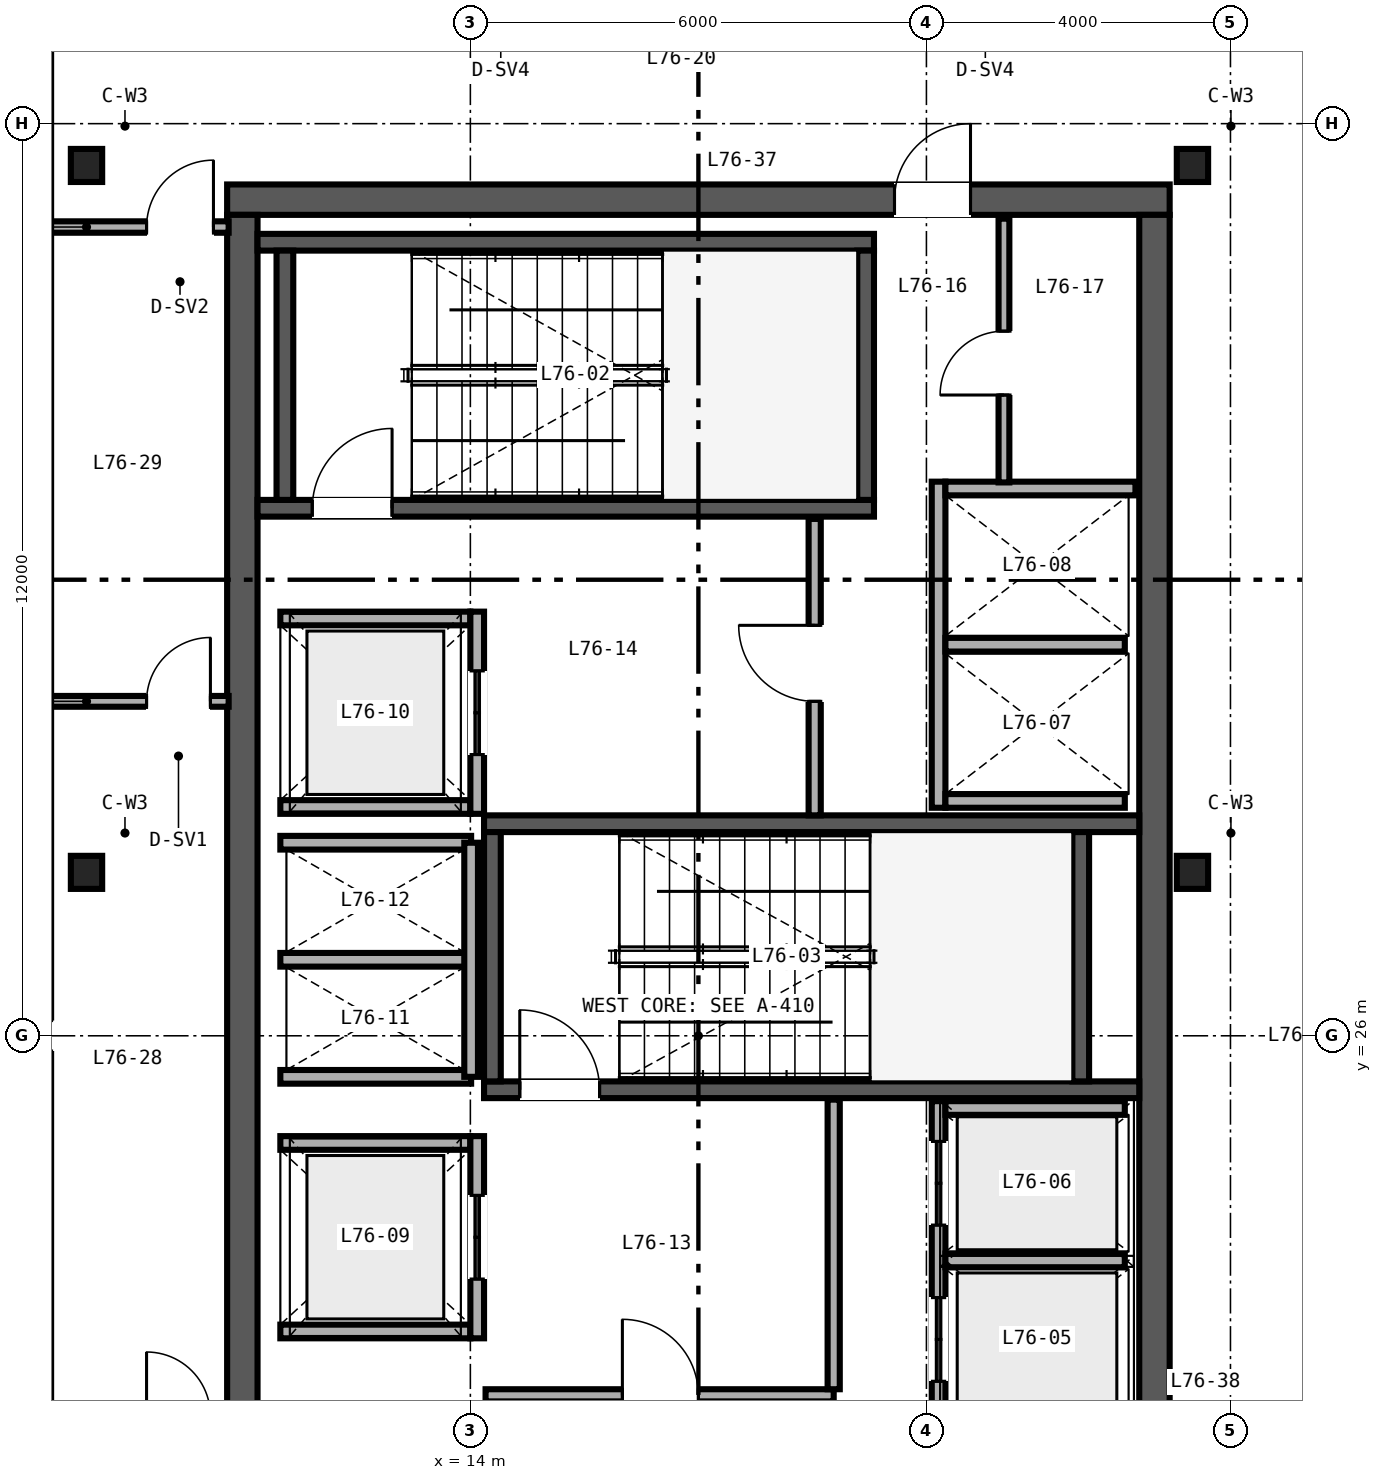
"""IFC4 building model, lengths in metres.
Left out: names, types, materials, properties, quantities, classifications, styles, units other than length and angle.
Written with IfcOpenShell. Run it as: python <this file> out.ifc"""

import sys

from ifc_helpers import new_model, si_unit, direction, frame, frame_2d, origin, origin_2d, place, context, subcontext, project, spatial, rectangle, i_section, extrude, source, transform, mapped, element, fill, save


model = new_model("IFC4")
c1 = context("Model", 3, precision=1e-05, world=origin(), true_north=direction((0.0, 1.0)))
c2 = subcontext(c1, "Body", "Model", "MODEL_VIEW")
j1 = project(units=[si_unit("LENGTHUNIT", "METRE"), si_unit("PLANEANGLEUNIT", "RADIAN")], contexts=[c1])
p1 = place(None, origin())
s1 = spatial("IfcSite", under=j1, at=p1, CompositionType="ELEMENT")
p2 = place(p1, origin())
s2 = spatial("IfcBuilding", under=s1, at=p2, CompositionType="ELEMENT")
p3 = place(p2, frame((0.0, 0.0, 297.6)))
s3 = spatial("IfcBuildingStorey", under=s2, at=p3, CompositionType="ELEMENT", Elevation=297.6)
p4 = place(p3, frame((10.8, 37.0, 0.0), z_axis=(0.0, 0.0, 1.0), x_axis=(1.0, 0.0, 0.0)))
e1 = element("IfcWall", 1, at=p4, inside=s3, PredefinedType="SHEAR", context=c2, shape_type="SweptSolid", body=[
    extrude(rectangle(XDim=12.4, YDim=0.4, at=frame_2d((6.2, 0.0))), origin(), (0.0, 0.0, 1.0), 3.32),
])
p5 = place(p4, frame((8.78, 0.0, 0.0)))
e2 = element("IfcOpeningElement", 2, at=p5, cuts=e1, PredefinedType="OPENING", context=c2, shape_type="SweptSolid", body=[
    extrude(rectangle(XDim=1.0, YDim=2.15, at=frame_2d((0.5, 1.075))), frame((0.0, 0.21, 0.0), z_axis=(0.0, -1.0, 0.0), x_axis=(1.0, 0.0, 0.0)), (0.0, 0.0, 1.0), 0.42),
])
for number, where, z_axis, x_axis in (
    (3, (11.0, 15.2, 0.0), (0.0, 0.0, 1.0), (0.0, 1.0, 0.0)),
    (4, (23.0, 15.2, 0.0), (0.0, 0.0, 1.0), (0.0, 1.0, 0.0)),
):
    element("IfcWall", number, at=place(p3, frame(where, z_axis=z_axis, x_axis=x_axis)), inside=s3, PredefinedType="SHEAR", context=c2, shape_type="SweptSolid", body=[
        extrude(rectangle(XDim=21.6, YDim=0.4, at=frame_2d((10.8, 0.0))), origin(), (0.0, 0.0, 1.0), 3.32),
    ])
p6 = place(p3, frame((11.2, 32.94, 0.0), z_axis=(0.0, 0.0, 1.0), x_axis=(1.0, 0.0, 0.0)))
e5 = element("IfcWall", 5, at=p6, inside=s3, PredefinedType="SHEAR", context=c2, shape_type="SweptSolid", body=[
    extrude(rectangle(XDim=8.11, YDim=0.22, at=frame_2d((4.055, 0.0))), origin(), (0.0, 0.0, 1.0), 3.4),
])
p7 = place(p6, frame((0.72, 0.0, 0.0)))
e6 = element("IfcOpeningElement", 6, at=p7, cuts=e5, PredefinedType="OPENING", context=c2, shape_type="SweptSolid", body=[
    extrude(rectangle(XDim=1.05, YDim=2.15, at=frame_2d((0.525, 1.075))), frame((0.0, 0.12, 0.0), z_axis=(0.0, -1.0, 0.0), x_axis=(1.0, 0.0, 0.0)), (0.0, 0.0, 1.0), 0.24),
])
p8 = place(p3, frame((11.2, 36.44, 0.0), z_axis=(0.0, 0.0, 1.0), x_axis=(1.0, 0.0, 0.0)))
e7 = element("IfcWall", 7, at=p8, inside=s3, PredefinedType="SHEAR", context=c2, shape_type="SweptSolid", body=[
    extrude(rectangle(XDim=8.11, YDim=0.22, at=frame_2d((4.055, 0.0))), origin(), (0.0, 0.0, 1.0), 3.4),
])
for number, where, z_axis, x_axis in (
    (8, (11.56, 33.05, 0.0), (0.0, 0.0, 1.0), (0.0, 1.0, 0.0)),
    (9, (19.2, 33.05, 0.0), (0.0, 0.0, 1.0), (0.0, 1.0, 0.0)),
):
    element("IfcWall", number, at=place(p3, frame(where, z_axis=z_axis, x_axis=x_axis)), inside=s3, PredefinedType="SHEAR", context=c2, shape_type="SweptSolid", body=[
        extrude(rectangle(XDim=3.28, YDim=0.22, at=frame_2d((1.64, 0.0))), origin(), (0.0, 0.0, 1.0), 3.4),
    ])
p9 = place(p3, frame((14.18, 25.29, 0.0), z_axis=(0.0, 0.0, 1.0), x_axis=(1.0, 0.0, 0.0)))
e10 = element("IfcWall", 10, at=p9, inside=s3, PredefinedType="SHEAR", context=c2, shape_type="SweptSolid", body=[
    extrude(rectangle(XDim=8.62, YDim=0.22, at=frame_2d((4.31, 0.0))), origin(), (0.0, 0.0, 1.0), 3.4),
])
p10 = place(p9, frame((0.47, 0.0, 0.0)))
e11 = element("IfcOpeningElement", 11, at=p10, cuts=e10, PredefinedType="OPENING", context=c2, shape_type="SweptSolid", body=[
    extrude(rectangle(XDim=1.05, YDim=2.15, at=frame_2d((0.525, 1.075))), frame((0.0, 0.12, 0.0), z_axis=(0.0, -1.0, 0.0), x_axis=(1.0, 0.0, 0.0)), (0.0, 0.0, 1.0), 0.24),
])
p11 = place(p3, frame((14.18, 28.79, 0.0), z_axis=(0.0, 0.0, 1.0), x_axis=(1.0, 0.0, 0.0)))
e12 = element("IfcWall", 12, at=p11, inside=s3, PredefinedType="SHEAR", context=c2, shape_type="SweptSolid", body=[
    extrude(rectangle(XDim=8.62, YDim=0.22, at=frame_2d((4.31, 0.0))), origin(), (0.0, 0.0, 1.0), 3.4),
])
for number, where, z_axis, x_axis in (
    (13, (14.29, 25.4, 0.0), (0.0, 0.0, 1.0), (0.0, 1.0, 0.0)),
    (14, (22.03, 25.4, 0.0), (0.0, 0.0, 1.0), (0.0, 1.0, 0.0)),
):
    element("IfcWall", number, at=place(p3, frame(where, z_axis=z_axis, x_axis=x_axis)), inside=s3, PredefinedType="SHEAR", context=c2, shape_type="SweptSolid", body=[
        extrude(rectangle(XDim=3.28, YDim=0.22, at=frame_2d((1.64, 0.0))), origin(), (0.0, 0.0, 1.0), 3.4),
    ])
m1 = source(origin(), c2, "Body", "SweptSolid", [
    extrude(i_section(OverallWidth=0.412, OverallDepth=0.435, WebThickness=0.036, FlangeThickness=0.057, FilletRadius=0.025, at=origin_2d()), origin(), (0.0, 0.0, 1.0), 3.32),
])
for number, where, z_axis, x_axis in (
    (15, (8.95, 28.15, 0.0), (0.0, 0.0, 1.0), (1.0, 0.0, 0.0)),
    (16, (23.5, 28.15, 0.0), (0.0, 0.0, 1.0), (1.0, 0.0, 0.0)),
    (17, (8.95, 37.45, 0.0), (0.0, 0.0, 1.0), (1.0, 0.0, 0.0)),
    (18, (23.5, 37.45, 0.0), (0.0, 0.0, 1.0), (1.0, 0.0, 0.0)),
):
    element("IfcColumn", number, at=place(p3, frame(where, z_axis=z_axis, x_axis=x_axis)), inside=s3, PredefinedType="COLUMN", context=c2, shape_type="MappedRepresentation", body=[
        mapped(m1, transform((0.0, 0.0, 0.0), scale=1.0)),
    ])
p12 = place(p3, frame((20.16, 18.82, 0.0), z_axis=(0.0, 0.0, 1.0), x_axis=(0.0, 1.0, 0.0)))
e19 = element("IfcWall", 19, at=p12, inside=s3, PredefinedType="SOLIDWALL", context=c2, shape_type="SweptSolid", body=[
    extrude(rectangle(XDim=6.32, YDim=0.18, at=frame_2d((3.16, 0.0))), origin(), (0.0, 0.0, 1.0), 2.42),
])
p13 = place(p12, frame((0.555, 0.0, 0.0)))
e20 = element("IfcOpeningElement", 20, at=p13, cuts=e19, PredefinedType="OPENING", context=c2, shape_type="SweptSolid", body=[
    extrude(rectangle(XDim=1.1, YDim=2.2, at=frame_2d((0.55, 1.1))), frame((0.0, 0.1, 0.0), z_axis=(0.0, -1.0, 0.0), x_axis=(1.0, 0.0, 0.0)), (0.0, 0.0, 1.0), 0.2),
])
p14 = place(p12, frame((2.635, 0.0, 0.0)))
e21 = element("IfcOpeningElement", 21, at=p14, cuts=e19, PredefinedType="OPENING", context=c2, shape_type="SweptSolid", body=[
    extrude(rectangle(XDim=1.1, YDim=2.2, at=frame_2d((0.55, 1.1))), frame((0.0, 0.1, 0.0), z_axis=(0.0, -1.0, 0.0), x_axis=(1.0, 0.0, 0.0)), (0.0, 0.0, 1.0), 0.2),
])
p15 = place(p12, frame((4.69, 0.0, 0.0)))
e22 = element("IfcOpeningElement", 22, at=p15, cuts=e19, PredefinedType="OPENING", context=c2, shape_type="SweptSolid", body=[
    extrude(rectangle(XDim=1.1, YDim=2.2, at=frame_2d((0.55, 1.1))), frame((0.0, 0.1, 0.0), z_axis=(0.0, -1.0, 0.0), x_axis=(1.0, 0.0, 0.0)), (0.0, 0.0, 1.0), 0.2),
])
for number, where, z_axis, x_axis in (
    (23, (20.25, 25.05, 0.0), (0.0, 0.0, 1.0), (1.0, 0.0, 0.0)),
    (24, (20.25, 23.045, 0.0), (0.0, 0.0, 1.0), (1.0, 0.0, 0.0)),
):
    element("IfcWall", number, at=place(p3, frame(where, z_axis=z_axis, x_axis=x_axis)), inside=s3, PredefinedType="SOLIDWALL", context=c2, shape_type="SweptSolid", body=[
        extrude(rectangle(XDim=2.36, YDim=0.18, at=frame_2d((1.18, 0.0))), origin(), (0.0, 0.0, 1.0), 3.32),
    ])
p16 = place(p3, frame((20.16, 29.0, 0.0), z_axis=(0.0, 0.0, 1.0), x_axis=(0.0, 1.0, 0.0)))
e25 = element("IfcWall", 25, at=p16, inside=s3, PredefinedType="SOLIDWALL", context=c2, shape_type="SweptSolid", body=[
    extrude(rectangle(XDim=4.29, YDim=0.18, at=frame_2d((2.145, 0.0))), origin(), (0.0, 0.0, 1.0), 3.32),
])
p17 = place(p3, frame((20.25, 29.09, 0.0), z_axis=(0.0, 0.0, 1.0), x_axis=(1.0, 0.0, 0.0)))
e26 = element("IfcWall", 26, at=p17, inside=s3, PredefinedType="SOLIDWALL", context=c2, shape_type="SweptSolid", body=[
    extrude(rectangle(XDim=2.36, YDim=0.18, at=frame_2d((1.18, 0.0))), origin(), (0.0, 0.0, 1.0), 3.32),
])
p18 = place(p3, frame((20.25, 33.2, 0.0), z_axis=(0.0, 0.0, 1.0), x_axis=(1.0, 0.0, 0.0)))
e27 = element("IfcWall", 27, at=p18, inside=s3, PredefinedType="SOLIDWALL", context=c2, shape_type="SweptSolid", body=[
    extrude(rectangle(XDim=2.5, YDim=0.18, at=frame_2d((1.25, 0.0))), origin(), (0.0, 0.0, 1.0), 3.32),
])
p19 = place(p3, frame((20.25, 31.145, 0.0), z_axis=(0.0, 0.0, 1.0), x_axis=(1.0, 0.0, 0.0)))
e28 = element("IfcWall", 28, at=p19, inside=s3, PredefinedType="SOLIDWALL", context=c2, shape_type="SweptSolid", body=[
    extrude(rectangle(XDim=2.36, YDim=0.18, at=frame_2d((1.18, 0.0))), origin(), (0.0, 0.0, 1.0), 3.32),
])
for number, where, z_axis, x_axis in (
    (29, (11.5, 22.11, 0.0), (0.0, 0.0, 1.0), (1.0, 0.0, 0.0)),
    (30, (11.5, 24.59, 0.0), (0.0, 0.0, 1.0), (1.0, 0.0, 0.0)),
):
    element("IfcWall", number, at=place(p3, frame(where, z_axis=z_axis, x_axis=x_axis)), inside=s3, PredefinedType="SOLIDWALL", context=c2, shape_type="SweptSolid", body=[
        extrude(rectangle(XDim=2.5, YDim=0.18, at=frame_2d((1.25, 0.0))), origin(), (0.0, 0.0, 1.0), 3.32),
    ])
p20 = place(p3, frame((14.09, 22.02, 0.0), z_axis=(0.0, 0.0, 1.0), x_axis=(0.0, 1.0, 0.0)))
e31 = element("IfcWall", 31, at=p20, inside=s3, PredefinedType="SOLIDWALL", context=c2, shape_type="SweptSolid", body=[
    extrude(rectangle(XDim=2.66, YDim=0.18, at=frame_2d((1.33, 0.0))), origin(), (0.0, 0.0, 1.0), 3.32),
])
p21 = place(p20, frame((0.78, 0.0, 0.0)))
e32 = element("IfcOpeningElement", 32, at=p21, cuts=e31, PredefinedType="OPENING", context=c2, shape_type="SweptSolid", body=[
    extrude(rectangle(XDim=1.1, YDim=2.2, at=frame_2d((0.55, 1.1))), frame((0.0, 0.1, 0.0), z_axis=(0.0, -1.0, 0.0), x_axis=(1.0, 0.0, 0.0)), (0.0, 0.0, 1.0), 0.2),
])
for number, where, z_axis, x_axis in (
    (33, (11.5, 29.01, 0.0), (0.0, 0.0, 1.0), (1.0, 0.0, 0.0)),
    (34, (11.5, 31.49, 0.0), (0.0, 0.0, 1.0), (1.0, 0.0, 0.0)),
):
    element("IfcWall", number, at=place(p3, frame(where, z_axis=z_axis, x_axis=x_axis)), inside=s3, PredefinedType="SOLIDWALL", context=c2, shape_type="SweptSolid", body=[
        extrude(rectangle(XDim=2.5, YDim=0.18, at=frame_2d((1.25, 0.0))), origin(), (0.0, 0.0, 1.0), 3.32),
    ])
p22 = place(p3, frame((14.09, 28.92, 0.0), z_axis=(0.0, 0.0, 1.0), x_axis=(0.0, 1.0, 0.0)))
e35 = element("IfcWall", 35, at=p22, inside=s3, PredefinedType="SOLIDWALL", context=c2, shape_type="SweptSolid", body=[
    extrude(rectangle(XDim=2.66, YDim=0.18, at=frame_2d((1.33, 0.0))), origin(), (0.0, 0.0, 1.0), 3.32),
])
p23 = place(p22, frame((0.78, 0.0, 0.0)))
e36 = element("IfcOpeningElement", 36, at=p23, cuts=e35, PredefinedType="OPENING", context=c2, shape_type="SweptSolid", body=[
    extrude(rectangle(XDim=1.1, YDim=2.2, at=frame_2d((0.55, 1.1))), frame((0.0, 0.1, 0.0), z_axis=(0.0, -1.0, 0.0), x_axis=(1.0, 0.0, 0.0)), (0.0, 0.0, 1.0), 0.2),
])
for number, where, z_axis, x_axis in (
    (37, (11.5, 25.46, 0.0), (0.0, 0.0, 1.0), (1.0, 0.0, 0.0)),
    (38, (11.5, 27.0, 0.0), (0.0, 0.0, 1.0), (1.0, 0.0, 0.0)),
    (39, (11.5, 28.54, 0.0), (0.0, 0.0, 1.0), (1.0, 0.0, 0.0)),
):
    element("IfcWall", number, at=place(p3, frame(where, z_axis=z_axis, x_axis=x_axis)), inside=s3, PredefinedType="SOLIDWALL", context=c2, shape_type="SweptSolid", body=[
        extrude(rectangle(XDim=2.51, YDim=0.18, at=frame_2d((1.255, 0.0))), origin(), (0.0, 0.0, 1.0), 3.32),
    ])
p24 = place(p3, frame((14.01, 25.46, 0.0), z_axis=(0.0, 0.0, 1.0), x_axis=(0.0, 1.0, 0.0)))
e40 = element("IfcWall", 40, at=p24, inside=s3, PredefinedType="SOLIDWALL", context=c2, shape_type="SweptSolid", body=[
    extrude(rectangle(XDim=3.08, YDim=0.18, at=frame_2d((1.54, 0.0))), origin(), (0.0, 0.0, 1.0), 3.32),
])
p25 = place(p3, frame((14.2, 21.27, 0.0), z_axis=(0.0, 0.0, 1.0), x_axis=(1.0, 0.0, 0.0)))
e41 = element("IfcWall", 41, at=p25, inside=s3, PredefinedType="PARTITIONING", context=c2, shape_type="SweptSolid", body=[
    extrude(rectangle(XDim=4.58, YDim=0.16, at=frame_2d((2.29, 0.0))), origin(), (0.0, 0.0, 1.0), 3.32),
])
p26 = place(p25, frame((1.8, 0.0, 0.0)))
e42 = element("IfcOpeningElement", 42, at=p26, cuts=e41, PredefinedType="OPENING", context=c2, shape_type="SweptSolid", body=[
    extrude(rectangle(XDim=1.0, YDim=2.15, at=frame_2d((0.5, 1.075))), frame((0.0, 0.09, 0.0), z_axis=(0.0, -1.0, 0.0), x_axis=(1.0, 0.0, 0.0)), (0.0, 0.0, 1.0), 0.18),
])
p27 = place(p3, frame((18.78, 21.35, 0.0), z_axis=(0.0, 0.0, 1.0), x_axis=(0.0, 1.0, 0.0)))
e43 = element("IfcWall", 43, at=p27, inside=s3, PredefinedType="PARTITIONING", context=c2, shape_type="SweptSolid", body=[
    extrude(rectangle(XDim=3.81, YDim=0.16, at=frame_2d((1.905, 0.0))), origin(), (0.0, 0.0, 1.0), 3.32),
])
p28 = place(p3, frame((18.53, 28.9, 0.0), z_axis=(0.0, 0.0, 1.0), x_axis=(0.0, 1.0, 0.0)))
e44 = element("IfcWall", 44, at=p28, inside=s3, PredefinedType="PARTITIONING", context=c2, shape_type="SweptSolid", body=[
    extrude(rectangle(XDim=3.9, YDim=0.16, at=frame_2d((1.95, 0.0))), origin(), (0.0, 0.0, 1.0), 3.32),
])
p29 = place(p28, frame((1.5, 0.0, 0.0)))
e45 = element("IfcOpeningElement", 45, at=p29, cuts=e44, PredefinedType="OPENING", context=c2, shape_type="SweptSolid", body=[
    extrude(rectangle(XDim=1.0, YDim=2.15, at=frame_2d((0.5, 1.075))), frame((0.0, 0.09, 0.0), z_axis=(0.0, -1.0, 0.0), x_axis=(1.0, 0.0, 0.0)), (0.0, 0.0, 1.0), 0.18),
])
p30 = place(p3, frame((21.02, 33.28, 0.0), z_axis=(0.0, 0.0, 1.0), x_axis=(0.0, 1.0, 0.0)))
e46 = element("IfcWall", 46, at=p30, inside=s3, PredefinedType="PARTITIONING", context=c2, shape_type="SweptSolid", body=[
    extrude(rectangle(XDim=3.47, YDim=0.142, at=frame_2d((1.735, 0.0))), origin(), (0.0, 0.0, 1.0), 3.32),
])
p31 = place(p30, frame((1.15, 0.0, 0.0)))
e47 = element("IfcOpeningElement", 47, at=p31, cuts=e46, PredefinedType="OPENING", context=c2, shape_type="SweptSolid", body=[
    extrude(rectangle(XDim=0.84, YDim=2.1, at=frame_2d((0.42, 1.05))), frame((0.0, 0.081, 0.0), z_axis=(0.0, -1.0, 0.0), x_axis=(1.0, 0.0, 0.0)), (0.0, 0.0, 1.0), 0.162),
])
p32 = place(p3, frame((8.16, 36.64, 0.0), z_axis=(0.0, 0.0, 1.0), x_axis=(1.0, 0.0, 0.0)))
e48 = element("IfcWall", 48, at=p32, inside=s3, PredefinedType="PARTITIONING", context=c2, shape_type="SweptSolid", body=[
    extrude(rectangle(XDim=2.66, YDim=0.15, at=frame_2d((1.33, 0.0))), origin(), (0.0, 0.0, 1.0), 2.703),
])
p33 = place(p32, frame((1.58, 0.0, 0.0)))
e49 = element("IfcOpeningElement", 49, at=p33, cuts=e48, PredefinedType="OPENING", context=c2, shape_type="SweptSolid", body=[
    extrude(rectangle(XDim=0.88, YDim=2.15, at=frame_2d((0.44, 1.075))), frame((0.0, 0.085, 0.0), z_axis=(0.0, -1.0, 0.0), x_axis=(1.0, 0.0, 0.0)), (0.0, 0.0, 1.0), 0.17),
])
p34 = place(p3, frame((8.16, 30.4, 0.0), z_axis=(0.0, 0.0, 1.0), x_axis=(1.0, 0.0, 0.0)))
e50 = element("IfcWall", 50, at=p34, inside=s3, PredefinedType="PARTITIONING", context=c2, shape_type="SweptSolid", body=[
    extrude(rectangle(XDim=2.66, YDim=0.142, at=frame_2d((1.33, 0.0))), origin(), (0.0, 0.0, 1.0), 2.703),
])
p35 = place(p34, frame((1.58, 0.0, 0.0)))
e51 = element("IfcOpeningElement", 51, at=p35, cuts=e50, PredefinedType="OPENING", context=c2, shape_type="SweptSolid", body=[
    extrude(rectangle(XDim=0.84, YDim=2.1, at=frame_2d((0.42, 1.05))), frame((0.0, 0.081, 0.0), z_axis=(0.0, -1.0, 0.0), x_axis=(1.0, 0.0, 0.0)), (0.0, 0.0, 1.0), 0.162),
])
m2 = source(origin(), c2, "Body", "SweptSolid", [
    extrude(rectangle(XDim=1.05, YDim=2.15, at=frame_2d((0.525, 1.075))), frame((0.0, 0.025, 0.0), z_axis=(0.0, -1.0, 0.0), x_axis=(1.0, 0.0, 0.0)), (0.0, 0.0, 1.0), 0.05),
])
p36 = place(p7, origin())
e52 = element("IfcDoor", 52, at=p36, inside=s3, OperationType="SINGLE_SWING_RIGHT", PredefinedType="DOOR", context=c2, shape_type="MappedRepresentation", body=[
    mapped(m2, transform((0.0, 0.0, 0.0), scale=1.0)),
])
fill(e6, e52)
p37 = place(p10, origin())
e53 = element("IfcDoor", 53, at=p37, inside=s3, OperationType="SINGLE_SWING_LEFT", PredefinedType="DOOR", context=c2, shape_type="MappedRepresentation", body=[
    mapped(m2, transform((0.0, 0.0, 0.0), scale=1.0)),
])
fill(e11, e53)
m3 = source(origin(), c2, "Body", "SweptSolid", [
    extrude(rectangle(XDim=1.1, YDim=2.2, at=frame_2d((0.55, 1.1))), frame((0.0, 0.025, 0.0), z_axis=(0.0, -1.0, 0.0), x_axis=(1.0, 0.0, 0.0)), (0.0, 0.0, 1.0), 0.05),
])
p38 = place(p14, origin())
e54 = element("IfcDoor", 54, at=p38, inside=s3, OperationType="DOUBLE_DOOR_SLIDING", PredefinedType="DOOR", context=c2, shape_type="MappedRepresentation", body=[
    mapped(m3, transform((0.0, 0.0, 0.0), scale=1.0)),
])
fill(e21, e54)
p39 = place(p15, origin())
e55 = element("IfcDoor", 55, at=p39, inside=s3, OperationType="DOUBLE_DOOR_SLIDING", PredefinedType="DOOR", context=c2, shape_type="MappedRepresentation", body=[
    mapped(m3, transform((0.0, 0.0, 0.0), scale=1.0)),
])
fill(e22, e55)
p40 = place(p21, origin())
e56 = element("IfcDoor", 56, at=p40, inside=s3, OperationType="DOUBLE_DOOR_SLIDING", PredefinedType="DOOR", context=c2, shape_type="MappedRepresentation", body=[
    mapped(m3, transform((0.0, 0.0, 0.0), scale=1.0)),
])
fill(e32, e56)
p41 = place(p23, origin())
e57 = element("IfcDoor", 57, at=p41, inside=s3, OperationType="DOUBLE_DOOR_SLIDING", PredefinedType="DOOR", context=c2, shape_type="MappedRepresentation", body=[
    mapped(m3, transform((0.0, 0.0, 0.0), scale=1.0)),
])
fill(e36, e57)
m4 = source(origin(), c2, "Body", "SweptSolid", [
    extrude(rectangle(XDim=1.0, YDim=2.15, at=frame_2d((0.5, 1.075))), frame((0.0, 0.025, 0.0), z_axis=(0.0, -1.0, 0.0), x_axis=(1.0, 0.0, 0.0)), (0.0, 0.0, 1.0), 0.05),
])
p42 = place(p26, origin())
e58 = element("IfcDoor", 58, at=p42, inside=s3, OperationType="SINGLE_SWING_LEFT", PredefinedType="DOOR", context=c2, shape_type="MappedRepresentation", body=[
    mapped(m4, transform((0.0, 0.0, 0.0), scale=1.0)),
])
fill(e42, e58)
p43 = place(p29, origin())
e59 = element("IfcDoor", 59, at=p43, inside=s3, OperationType="SINGLE_SWING_RIGHT", PredefinedType="DOOR", context=c2, shape_type="MappedRepresentation", body=[
    mapped(m4, transform((0.0, 0.0, 0.0), scale=1.0)),
])
fill(e45, e59)
m5 = source(origin(), c2, "Body", "SweptSolid", [
    extrude(rectangle(XDim=0.84, YDim=2.1, at=frame_2d((0.42, 1.05))), frame((0.0, 0.025, 0.0), z_axis=(0.0, -1.0, 0.0), x_axis=(1.0, 0.0, 0.0)), (0.0, 0.0, 1.0), 0.05),
])
p44 = place(p31, origin())
e60 = element("IfcDoor", 60, at=p44, inside=s3, OperationType="SINGLE_SWING_LEFT", PredefinedType="DOOR", context=c2, shape_type="MappedRepresentation", body=[
    mapped(m5, transform((0.0, 0.0, 0.0), scale=1.0)),
])
fill(e47, e60)
p45 = place(p5, origin())
e61 = element("IfcDoor", 61, at=p45, inside=s3, OperationType="SINGLE_SWING_RIGHT", PredefinedType="DOOR", context=c2, shape_type="MappedRepresentation", body=[
    mapped(m4, transform((0.0, 0.0, 0.0), scale=1.0)),
])
fill(e2, e61)
m6 = source(origin(), c2, "Body", "SweptSolid", [
    extrude(rectangle(XDim=0.88, YDim=2.15, at=frame_2d((0.44, 1.075))), frame((0.0, 0.025, 0.0), z_axis=(0.0, -1.0, 0.0), x_axis=(1.0, 0.0, 0.0)), (0.0, 0.0, 1.0), 0.05),
])
p46 = place(p33, origin())
e62 = element("IfcDoor", 62, at=p46, inside=s3, OperationType="SINGLE_SWING_RIGHT", PredefinedType="DOOR", context=c2, shape_type="MappedRepresentation", body=[
    mapped(m6, transform((0.0, 0.0, 0.0), scale=1.0)),
])
fill(e49, e62)
p47 = place(p35, origin())
e63 = element("IfcDoor", 63, at=p47, inside=s3, OperationType="SINGLE_SWING_RIGHT", PredefinedType="DOOR", context=c2, shape_type="MappedRepresentation", body=[
    mapped(m5, transform((0.0, 0.0, 0.0), scale=1.0)),
])
fill(e51, e63)
save(model, sys.argv[1])
